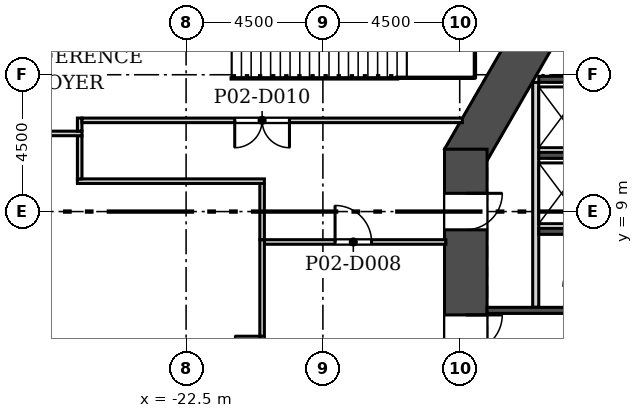
"""IFC4 building model, lengths in metres.
Left out: names, types, materials, properties, quantities, classifications, styles, units other than length and angle.
Written with IfcOpenShell. Run it as: python <this file> out.ifc"""

import sys

from ifc_helpers import new_model, si_unit, direction, frame, frame_2d, origin, place, context, subcontext, project, spatial, rectangle, extrude, element, fill, save


model = new_model("IFC4")
c1 = context("Model", 3, precision=1e-05, world=origin(), true_north=direction((0.0, 1.0)))
c2 = subcontext(c1, "Body", "Model", "MODEL_VIEW")
j1 = project(units=[si_unit("LENGTHUNIT", "METRE"), si_unit("PLANEANGLEUNIT", "RADIAN")], contexts=[c1])
p1 = place(None, origin())
s1 = spatial("IfcSite", under=j1, at=p1, CompositionType="ELEMENT")
p2 = place(p1, origin())
s2 = spatial("IfcBuilding", under=s1, at=p2, CompositionType="ELEMENT")
p3 = place(p2, frame((0.0, 0.0, 14.0)))
s3 = spatial("IfcBuildingStorey", under=s2, at=p3, CompositionType="ELEMENT", Elevation=14.0)
p4 = place(p3, frame((-8.805, 18.65, 0.0), z_axis=(0.0, 0.0, 1.0), x_axis=(-0.50000187635, -0.866024320471, 0.0)))
e1 = element("IfcWall", 1, at=p4, inside=s3, PredefinedType="SHEAR", context=c2, shape_type="SweptSolid", body=[
    extrude(rectangle(XDim=9.177, YDim=1.4, at=frame_2d((4.588, 0.0))), origin(), (0.0, 0.0, 1.0), 6.0),
])
p5 = place(p3, frame((-13.3, 11.052, 0.0), z_axis=(0.0, 0.0, 1.0), x_axis=(0.0, -1.0, 0.0)))
e2 = element("IfcWall", 2, at=p5, inside=s3, PredefinedType="SHEAR", context=c2, shape_type="SweptSolid", body=[
    extrude(rectangle(XDim=10.202, YDim=1.4, at=frame_2d((5.101, 0.0))), origin(), (0.0, 0.0, 1.0), 6.0),
])
p6 = place(p5, frame((5.453, 0.0, 0.0)))
e3 = element("IfcOpeningElement", 3, at=p6, cuts=e2, PredefinedType="OPENING", context=c2, shape_type="SweptSolid", body=[
    extrude(rectangle(XDim=1.2, YDim=2.1, at=frame_2d((0.6, 1.05))), frame((0.0, 0.71, 0.0), z_axis=(0.0, -1.0, 0.0), x_axis=(1.0, 0.0, 0.0)), (0.0, 0.0, 1.0), 1.42),
])
p7 = place(p5, frame((1.453, 0.0, 0.0)))
e4 = element("IfcOpeningElement", 4, at=p7, cuts=e2, PredefinedType="OPENING", context=c2, shape_type="SweptSolid", body=[
    extrude(rectangle(XDim=1.2, YDim=2.1, at=frame_2d((0.6, 1.05))), frame((0.0, 0.71, 0.0), z_axis=(0.0, -1.0, 0.0), x_axis=(1.0, 0.0, 0.0)), (0.0, 0.0, 1.0), 1.42),
])
p8 = place(p3, frame((-4.853, 74.393, 0.0), z_axis=(0.0, 0.0, 1.0), x_axis=(-0.49999894854, -0.866026010844, 0.0)))
e5 = element("IfcWall", 5, at=p8, inside=s3, PredefinedType="SOLIDWALL", context=c2, shape_type="SweptSolid", body=[
    extrude(rectangle(XDim=76.0, YDim=0.34, at=frame_2d((38.0, 0.0))), origin(), (0.0, 0.0, 1.0), 5.7),
])
p9 = place(p8, frame((1.058, 0.0, 0.9)))
e6 = element("IfcOpeningElement", 6, at=p9, cuts=e5, PredefinedType="OPENING", context=c2, shape_type="SweptSolid", body=[
    extrude(rectangle(XDim=1.885, YDim=3.5, at=frame_2d((0.942, 1.75))), frame((0.0, 0.18, 0.0), z_axis=(0.0, -1.0, 0.0), x_axis=(1.0, 0.0, 0.0)), (0.0, 0.0, 1.0), 0.36),
])
p10 = place(p8, frame((4.058, 0.0, 0.9)))
e7 = element("IfcOpeningElement", 7, at=p10, cuts=e5, PredefinedType="OPENING", context=c2, shape_type="SweptSolid", body=[
    extrude(rectangle(XDim=1.885, YDim=3.5, at=frame_2d((0.942, 1.75))), frame((0.0, 0.18, 0.0), z_axis=(0.0, -1.0, 0.0), x_axis=(1.0, 0.0, 0.0)), (0.0, 0.0, 1.0), 0.36),
])
p11 = place(p8, frame((7.058, 0.0, 0.9)))
e8 = element("IfcOpeningElement", 8, at=p11, cuts=e5, PredefinedType="OPENING", context=c2, shape_type="SweptSolid", body=[
    extrude(rectangle(XDim=1.885, YDim=3.5, at=frame_2d((0.942, 1.75))), frame((0.0, 0.18, 0.0), z_axis=(0.0, -1.0, 0.0), x_axis=(1.0, 0.0, 0.0)), (0.0, 0.0, 1.0), 0.36),
])
p12 = place(p8, frame((10.058, 0.0, 0.9)))
e9 = element("IfcOpeningElement", 9, at=p12, cuts=e5, PredefinedType="OPENING", context=c2, shape_type="SweptSolid", body=[
    extrude(rectangle(XDim=1.885, YDim=3.5, at=frame_2d((0.942, 1.75))), frame((0.0, 0.18, 0.0), z_axis=(0.0, -1.0, 0.0), x_axis=(1.0, 0.0, 0.0)), (0.0, 0.0, 1.0), 0.36),
])
p13 = place(p8, frame((13.058, 0.0, 0.9)))
e10 = element("IfcOpeningElement", 10, at=p13, cuts=e5, PredefinedType="OPENING", context=c2, shape_type="SweptSolid", body=[
    extrude(rectangle(XDim=1.885, YDim=3.5, at=frame_2d((0.942, 1.75))), frame((0.0, 0.18, 0.0), z_axis=(0.0, -1.0, 0.0), x_axis=(1.0, 0.0, 0.0)), (0.0, 0.0, 1.0), 0.36),
])
p14 = place(p8, frame((16.058, 0.0, 0.9)))
e11 = element("IfcOpeningElement", 11, at=p14, cuts=e5, PredefinedType="OPENING", context=c2, shape_type="SweptSolid", body=[
    extrude(rectangle(XDim=1.885, YDim=3.5, at=frame_2d((0.942, 1.75))), frame((0.0, 0.18, 0.0), z_axis=(0.0, -1.0, 0.0), x_axis=(1.0, 0.0, 0.0)), (0.0, 0.0, 1.0), 0.36),
])
p15 = place(p8, frame((19.058, 0.0, 0.9)))
e12 = element("IfcOpeningElement", 12, at=p15, cuts=e5, PredefinedType="OPENING", context=c2, shape_type="SweptSolid", body=[
    extrude(rectangle(XDim=1.885, YDim=3.5, at=frame_2d((0.942, 1.75))), frame((0.0, 0.18, 0.0), z_axis=(0.0, -1.0, 0.0), x_axis=(1.0, 0.0, 0.0)), (0.0, 0.0, 1.0), 0.36),
])
p16 = place(p8, frame((22.058, 0.0, 0.9)))
e13 = element("IfcOpeningElement", 13, at=p16, cuts=e5, PredefinedType="OPENING", context=c2, shape_type="SweptSolid", body=[
    extrude(rectangle(XDim=1.885, YDim=3.5, at=frame_2d((0.942, 1.75))), frame((0.0, 0.18, 0.0), z_axis=(0.0, -1.0, 0.0), x_axis=(1.0, 0.0, 0.0)), (0.0, 0.0, 1.0), 0.36),
])
p17 = place(p8, frame((25.058, 0.0, 0.9)))
e14 = element("IfcOpeningElement", 14, at=p17, cuts=e5, PredefinedType="OPENING", context=c2, shape_type="SweptSolid", body=[
    extrude(rectangle(XDim=1.885, YDim=3.5, at=frame_2d((0.942, 1.75))), frame((0.0, 0.18, 0.0), z_axis=(0.0, -1.0, 0.0), x_axis=(1.0, 0.0, 0.0)), (0.0, 0.0, 1.0), 0.36),
])
p18 = place(p8, frame((28.058, 0.0, 0.9)))
e15 = element("IfcOpeningElement", 15, at=p18, cuts=e5, PredefinedType="OPENING", context=c2, shape_type="SweptSolid", body=[
    extrude(rectangle(XDim=1.885, YDim=3.5, at=frame_2d((0.942, 1.75))), frame((0.0, 0.18, 0.0), z_axis=(0.0, -1.0, 0.0), x_axis=(1.0, 0.0, 0.0)), (0.0, 0.0, 1.0), 0.36),
])
p19 = place(p8, frame((31.058, 0.0, 0.9)))
e16 = element("IfcOpeningElement", 16, at=p19, cuts=e5, PredefinedType="OPENING", context=c2, shape_type="SweptSolid", body=[
    extrude(rectangle(XDim=1.885, YDim=3.5, at=frame_2d((0.942, 1.75))), frame((0.0, 0.18, 0.0), z_axis=(0.0, -1.0, 0.0), x_axis=(1.0, 0.0, 0.0)), (0.0, 0.0, 1.0), 0.36),
])
p20 = place(p8, frame((34.058, 0.0, 0.9)))
e17 = element("IfcOpeningElement", 17, at=p20, cuts=e5, PredefinedType="OPENING", context=c2, shape_type="SweptSolid", body=[
    extrude(rectangle(XDim=1.885, YDim=3.5, at=frame_2d((0.942, 1.75))), frame((0.0, 0.18, 0.0), z_axis=(0.0, -1.0, 0.0), x_axis=(1.0, 0.0, 0.0)), (0.0, 0.0, 1.0), 0.36),
])
p21 = place(p8, frame((37.058, 0.0, 0.9)))
e18 = element("IfcOpeningElement", 18, at=p21, cuts=e5, PredefinedType="OPENING", context=c2, shape_type="SweptSolid", body=[
    extrude(rectangle(XDim=1.885, YDim=3.5, at=frame_2d((0.942, 1.75))), frame((0.0, 0.18, 0.0), z_axis=(0.0, -1.0, 0.0), x_axis=(1.0, 0.0, 0.0)), (0.0, 0.0, 1.0), 0.36),
])
p22 = place(p8, frame((40.058, 0.0, 0.9)))
e19 = element("IfcOpeningElement", 19, at=p22, cuts=e5, PredefinedType="OPENING", context=c2, shape_type="SweptSolid", body=[
    extrude(rectangle(XDim=1.885, YDim=3.5, at=frame_2d((0.942, 1.75))), frame((0.0, 0.18, 0.0), z_axis=(0.0, -1.0, 0.0), x_axis=(1.0, 0.0, 0.0)), (0.0, 0.0, 1.0), 0.36),
])
p23 = place(p8, frame((43.058, 0.0, 0.9)))
e20 = element("IfcOpeningElement", 20, at=p23, cuts=e5, PredefinedType="OPENING", context=c2, shape_type="SweptSolid", body=[
    extrude(rectangle(XDim=1.885, YDim=3.5, at=frame_2d((0.942, 1.75))), frame((0.0, 0.18, 0.0), z_axis=(0.0, -1.0, 0.0), x_axis=(1.0, 0.0, 0.0)), (0.0, 0.0, 1.0), 0.36),
])
p24 = place(p8, frame((46.058, 0.0, 0.9)))
e21 = element("IfcOpeningElement", 21, at=p24, cuts=e5, PredefinedType="OPENING", context=c2, shape_type="SweptSolid", body=[
    extrude(rectangle(XDim=1.885, YDim=3.5, at=frame_2d((0.942, 1.75))), frame((0.0, 0.18, 0.0), z_axis=(0.0, -1.0, 0.0), x_axis=(1.0, 0.0, 0.0)), (0.0, 0.0, 1.0), 0.36),
])
p25 = place(p8, frame((49.058, 0.0, 0.9)))
e22 = element("IfcOpeningElement", 22, at=p25, cuts=e5, PredefinedType="OPENING", context=c2, shape_type="SweptSolid", body=[
    extrude(rectangle(XDim=1.885, YDim=3.5, at=frame_2d((0.942, 1.75))), frame((0.0, 0.18, 0.0), z_axis=(0.0, -1.0, 0.0), x_axis=(1.0, 0.0, 0.0)), (0.0, 0.0, 1.0), 0.36),
])
p26 = place(p8, frame((52.058, 0.0, 0.9)))
e23 = element("IfcOpeningElement", 23, at=p26, cuts=e5, PredefinedType="OPENING", context=c2, shape_type="SweptSolid", body=[
    extrude(rectangle(XDim=1.885, YDim=3.5, at=frame_2d((0.942, 1.75))), frame((0.0, 0.18, 0.0), z_axis=(0.0, -1.0, 0.0), x_axis=(1.0, 0.0, 0.0)), (0.0, 0.0, 1.0), 0.36),
])
p27 = place(p8, frame((55.058, 0.0, 0.9)))
e24 = element("IfcOpeningElement", 24, at=p27, cuts=e5, PredefinedType="OPENING", context=c2, shape_type="SweptSolid", body=[
    extrude(rectangle(XDim=1.885, YDim=3.5, at=frame_2d((0.942, 1.75))), frame((0.0, 0.18, 0.0), z_axis=(0.0, -1.0, 0.0), x_axis=(1.0, 0.0, 0.0)), (0.0, 0.0, 1.0), 0.36),
])
p28 = place(p8, frame((58.058, 0.0, 0.9)))
e25 = element("IfcOpeningElement", 25, at=p28, cuts=e5, PredefinedType="OPENING", context=c2, shape_type="SweptSolid", body=[
    extrude(rectangle(XDim=1.885, YDim=3.5, at=frame_2d((0.942, 1.75))), frame((0.0, 0.18, 0.0), z_axis=(0.0, -1.0, 0.0), x_axis=(1.0, 0.0, 0.0)), (0.0, 0.0, 1.0), 0.36),
])
p29 = place(p8, frame((61.058, 0.0, 0.9)))
e26 = element("IfcOpeningElement", 26, at=p29, cuts=e5, PredefinedType="OPENING", context=c2, shape_type="SweptSolid", body=[
    extrude(rectangle(XDim=1.885, YDim=3.5, at=frame_2d((0.942, 1.75))), frame((0.0, 0.18, 0.0), z_axis=(0.0, -1.0, 0.0), x_axis=(1.0, 0.0, 0.0)), (0.0, 0.0, 1.0), 0.36),
])
p30 = place(p8, frame((64.058, 0.0, 0.9)))
e27 = element("IfcOpeningElement", 27, at=p30, cuts=e5, PredefinedType="OPENING", context=c2, shape_type="SweptSolid", body=[
    extrude(rectangle(XDim=1.885, YDim=3.5, at=frame_2d((0.942, 1.75))), frame((0.0, 0.18, 0.0), z_axis=(0.0, -1.0, 0.0), x_axis=(1.0, 0.0, 0.0)), (0.0, 0.0, 1.0), 0.36),
])
p31 = place(p8, frame((67.058, 0.0, 0.9)))
e28 = element("IfcOpeningElement", 28, at=p31, cuts=e5, PredefinedType="OPENING", context=c2, shape_type="SweptSolid", body=[
    extrude(rectangle(XDim=1.885, YDim=3.5, at=frame_2d((0.942, 1.75))), frame((0.0, 0.18, 0.0), z_axis=(0.0, -1.0, 0.0), x_axis=(1.0, 0.0, 0.0)), (0.0, 0.0, 1.0), 0.36),
])
p32 = place(p8, frame((70.058, 0.0, 0.9)))
e29 = element("IfcOpeningElement", 29, at=p32, cuts=e5, PredefinedType="OPENING", context=c2, shape_type="SweptSolid", body=[
    extrude(rectangle(XDim=1.885, YDim=3.5, at=frame_2d((0.942, 1.75))), frame((0.0, 0.18, 0.0), z_axis=(0.0, -1.0, 0.0), x_axis=(1.0, 0.0, 0.0)), (0.0, 0.0, 1.0), 0.36),
])
p33 = place(p8, frame((73.058, 0.0, 0.9)))
e30 = element("IfcOpeningElement", 30, at=p33, cuts=e5, PredefinedType="OPENING", context=c2, shape_type="SweptSolid", body=[
    extrude(rectangle(XDim=1.885, YDim=3.5, at=frame_2d((0.942, 1.75))), frame((0.0, 0.18, 0.0), z_axis=(0.0, -1.0, 0.0), x_axis=(1.0, 0.0, 0.0)), (0.0, 0.0, 1.0), 0.36),
])
p34 = place(p3, frame((-11.0, 5.85, 0.0), z_axis=(0.0, 0.0, 1.0), x_axis=(0.0, 1.0, 0.0)))
e31 = element("IfcWall", 31, at=p34, inside=s3, PredefinedType="SOLIDWALL", context=c2, shape_type="SweptSolid", body=[
    extrude(rectangle(XDim=7.4, YDim=0.2, at=frame_2d((3.7, 0.0))), origin(), (0.0, 0.0, 1.0), 5.7),
])
p35 = place(p3, frame((-10.9, 8.35, -0.3), z_axis=(0.0, 0.0, 1.0), x_axis=(1.0, 0.0, 0.0)))
e32 = element("IfcWall", 32, at=p35, inside=s3, PredefinedType="SOLIDWALL", context=c2, shape_type="SweptSolid", body=[
    extrude(rectangle(XDim=2.0, YDim=0.2, at=frame_2d((1.0, 0.0))), origin(), (0.0, 0.0, 1.0), 6.0),
])
p36 = place(p3, frame((-12.6, 5.75, -0.3), z_axis=(0.0, 0.0, 1.0), x_axis=(1.0, 0.0, 0.0)))
e33 = element("IfcWall", 33, at=p36, inside=s3, PredefinedType="SOLIDWALL", context=c2, shape_type="SweptSolid", body=[
    extrude(rectangle(XDim=11.4, YDim=0.2, at=frame_2d((5.7, 0.0))), origin(), (0.0, 0.0, 1.0), 6.0),
])
for number, where, z_axis, x_axis in (
    (34, (-10.9, 10.85, -0.3), (0.0, 0.0, 1.0), (1.0, 0.0, 0.0)),
    (35, (-10.9, 13.35, -0.3), (0.0, 0.0, 1.0), (1.0, 0.0, 0.0)),
):
    element("IfcWall", number, at=place(p3, frame(where, z_axis=z_axis, x_axis=x_axis)), inside=s3, PredefinedType="SOLIDWALL", context=c2, shape_type="SweptSolid", body=[
        extrude(rectangle(XDim=2.0, YDim=0.2, at=frame_2d((1.0, 0.0))), origin(), (0.0, 0.0, 1.0), 6.0),
    ])
p37 = place(p3, frame((-19.925, 8.0, 0.0), z_axis=(0.0, 0.0, 1.0), x_axis=(1.0, 0.0, 0.0)))
e36 = element("IfcWall", 36, at=p37, inside=s3, PredefinedType="PARTITIONING", context=c2, shape_type="SweptSolid", body=[
    extrude(rectangle(XDim=5.97, YDim=0.15, at=frame_2d((2.985, 0.0))), origin(), (0.0, 0.0, 1.0), 5.7),
])
p38 = place(p37, frame((2.325, 0.0, 0.0)))
e37 = element("IfcOpeningElement", 37, at=p38, cuts=e36, PredefinedType="OPENING", context=c2, shape_type="SweptSolid", body=[
    extrude(rectangle(XDim=1.2, YDim=2.1, at=frame_2d((0.6, 1.05))), frame((0.0, 0.085, 0.0), z_axis=(0.0, -1.0, 0.0), x_axis=(1.0, 0.0, 0.0)), (0.0, 0.0, 1.0), 0.17),
])
p39 = place(p3, frame((-20.0, 8.075, 0.0), z_axis=(0.0, 0.0, 1.0), x_axis=(0.0, -1.0, 0.0)))
e38 = element("IfcWall", 38, at=p39, inside=s3, PredefinedType="PARTITIONING", context=c2, shape_type="SweptSolid", body=[
    extrude(rectangle(XDim=7.78, YDim=0.15, at=frame_2d((3.89, 0.0))), origin(), (0.0, 0.0, 1.0), 5.7),
])
p40 = place(p39, frame((3.175, 0.0, 0.0)))
e39 = element("IfcOpeningElement", 39, at=p40, cuts=e38, PredefinedType="OPENING", context=c2, shape_type="SweptSolid", body=[
    extrude(rectangle(XDim=1.8, YDim=2.1, at=frame_2d((0.9, 1.05))), frame((0.0, 0.085, 0.0), z_axis=(0.0, -1.0, 0.0), x_axis=(1.0, 0.0, 0.0)), (0.0, 0.0, 1.0), 0.17),
])
p41 = place(p3, frame((-20.0, 9.925, 0.0), z_axis=(0.0, 0.0, 1.0), x_axis=(0.0, -1.0, 0.0)))
e40 = element("IfcWall", 40, at=p41, inside=s3, PredefinedType="PARTITIONING", context=c2, shape_type="SweptSolid", body=[
    extrude(rectangle(XDim=1.85, YDim=0.15, at=frame_2d((0.925, 0.0))), origin(), (0.0, 0.0, 1.0), 5.7),
])
p42 = place(p3, frame((-26.075, 10.0, 0.0), z_axis=(0.0, 0.0, 1.0), x_axis=(1.0, 0.0, 0.0)))
e41 = element("IfcWall", 41, at=p42, inside=s3, PredefinedType="PARTITIONING", context=c2, shape_type="SweptSolid", body=[
    extrude(rectangle(XDim=6.15, YDim=0.15, at=frame_2d((3.075, 0.0))), origin(), (0.0, 0.0, 1.0), 5.7),
])
p43 = place(p3, frame((-26.0, 11.495, 0.0), z_axis=(0.0, 0.0, 1.0), x_axis=(0.0, -1.0, 0.0)))
e42 = element("IfcWall", 42, at=p43, inside=s3, PredefinedType="PARTITIONING", context=c2, shape_type="SweptSolid", body=[
    extrude(rectangle(XDim=1.42, YDim=0.15, at=frame_2d((0.71, 0.0))), origin(), (0.0, 0.0, 1.0), 5.7),
])
p44 = place(p3, frame((-40.968, 11.57, 0.0), z_axis=(0.0, 0.0, 1.0), x_axis=(1.0, 0.0, 0.0)))
e43 = element("IfcWall", 43, at=p44, inside=s3, PredefinedType="PARTITIONING", context=c2, shape_type="SweptSolid", body=[
    extrude(rectangle(XDim=15.043, YDim=0.15, at=frame_2d((7.521, 0.0))), origin(), (0.0, 0.0, 1.0), 5.7),
])
p45 = place(p44, frame((2.068, 0.0, 0.0)))
e44 = element("IfcOpeningElement", 44, at=p45, cuts=e43, PredefinedType="OPENING", context=c2, shape_type="SweptSolid", body=[
    extrude(rectangle(XDim=1.8, YDim=2.1, at=frame_2d((0.9, 1.05))), frame((0.0, 0.085, 0.0), z_axis=(0.0, -1.0, 0.0), x_axis=(1.0, 0.0, 0.0)), (0.0, 0.0, 1.0), 0.17),
])
p46 = place(p3, frame((-26.0, 11.645, 0.0), z_axis=(0.0, 0.0, 1.0), x_axis=(0.0, 1.0, 0.0)))
e45 = element("IfcWall", 45, at=p46, inside=s3, PredefinedType="PARTITIONING", context=c2, shape_type="SweptSolid", body=[
    extrude(rectangle(XDim=0.43, YDim=0.15, at=frame_2d((0.215, 0.0))), origin(), (0.0, 0.0, 1.0), 5.7),
])
p47 = place(p3, frame((-25.925, 12.0, 0.0), z_axis=(0.0, 0.0, 1.0), x_axis=(1.0, 0.0, 0.0)))
e46 = element("IfcWall", 46, at=p47, inside=s3, PredefinedType="PARTITIONING", context=c2, shape_type="SweptSolid", body=[
    extrude(rectangle(XDim=12.512, YDim=0.15, at=frame_2d((6.256, 0.0))), origin(), (0.0, 0.0, 1.0), 5.7),
])
p48 = place(p47, frame((5.025, 0.0, 0.0)))
e47 = element("IfcOpeningElement", 47, at=p48, cuts=e46, PredefinedType="OPENING", context=c2, shape_type="SweptSolid", body=[
    extrude(rectangle(XDim=1.8, YDim=2.1, at=frame_2d((0.9, 1.05))), frame((0.0, 0.085, 0.0), z_axis=(0.0, -1.0, 0.0), x_axis=(1.0, 0.0, 0.0)), (0.0, 0.0, 1.0), 0.17),
])
p49 = place(p3, frame((-26.761, 19.108, 0.0), z_axis=(0.0, 0.0, 1.0), x_axis=(-0.499979843709, -0.866037040711, 0.0)))
e48 = element("IfcWall", 48, at=p49, inside=s3, PredefinedType="SOLIDWALL", context=c2, shape_type="SweptSolid", body=[
    extrude(rectangle(XDim=8.293, YDim=0.25, at=frame_2d((4.146, 0.0))), origin(), (0.0, 0.0, 1.0), 5.7),
])
p50 = place(p3, frame((-13.125, 13.45, 0.0), z_axis=(0.0, 0.0, 1.0), x_axis=(0.0, 1.0, 0.0)))
e49 = element("IfcWall", 49, at=p50, inside=s3, PredefinedType="SOLIDWALL", context=c2, shape_type="SweptSolid", body=[
    extrude(rectangle(XDim=5.1, YDim=0.25, at=frame_2d((2.55, 0.0))), origin(), (0.0, 0.0, 1.0), 2.8),
])
p51 = place(p3, frame((-13.125, 13.525, 0.0), z_axis=(0.0, 0.0, 1.0), x_axis=(-1.0, 0.0, 0.0)))
e50 = element("IfcWall", 50, at=p51, inside=s3, PredefinedType="SOLIDWALL", context=c2, shape_type="SweptSolid", body=[
    extrude(rectangle(XDim=2.31, YDim=0.25, at=frame_2d((1.155, 0.0))), origin(), (0.0, 0.0, 1.0), 2.8),
])
p52 = place(p6, origin())
e51 = element("IfcDoor", 51, at=p52, inside=s3, OperationType="SINGLE_SWING_LEFT", PredefinedType="DOOR", context=c2, shape_type="SweptSolid", body=[
    extrude(rectangle(XDim=1.2, YDim=2.1, at=frame_2d((0.6, 1.05))), frame((0.0, 0.025, 0.0), z_axis=(0.0, -1.0, 0.0), x_axis=(1.0, 0.0, 0.0)), (0.0, 0.0, 1.0), 0.05),
])
fill(e3, e51)
p53 = place(p7, origin())
e52 = element("IfcDoor", 52, at=p53, inside=s3, OperationType="SINGLE_SWING_LEFT", PredefinedType="DOOR", context=c2, shape_type="SweptSolid", body=[
    extrude(rectangle(XDim=1.2, YDim=2.1, at=frame_2d((0.6, 1.05))), frame((0.0, 0.025, 0.0), z_axis=(0.0, -1.0, 0.0), x_axis=(1.0, 0.0, 0.0)), (0.0, 0.0, 1.0), 0.05),
])
fill(e4, e52)
p54 = place(p38, origin())
e53 = element("IfcDoor", 53, at=p54, inside=s3, OperationType="SINGLE_SWING_LEFT", PredefinedType="DOOR", context=c2, shape_type="SweptSolid", body=[
    extrude(rectangle(XDim=1.2, YDim=2.1, at=frame_2d((0.6, 1.05))), frame((0.0, 0.025, 0.0), z_axis=(0.0, -1.0, 0.0), x_axis=(1.0, 0.0, 0.0)), (0.0, 0.0, 1.0), 0.05),
])
fill(e37, e53)
p55 = place(p48, frame((1.8, 0.0, 0.0), z_axis=(0.0, 0.0, 1.0), x_axis=(-1.0, 0.0, 0.0)))
e54 = element("IfcDoor", 54, at=p55, inside=s3, OperationType="DOUBLE_DOOR_SINGLE_SWING", PredefinedType="DOOR", context=c2, shape_type="SweptSolid", body=[
    extrude(rectangle(XDim=1.8, YDim=2.1, at=frame_2d((0.9, 1.05))), frame((0.0, 0.025, 0.0), z_axis=(0.0, -1.0, 0.0), x_axis=(1.0, 0.0, 0.0)), (0.0, 0.0, 1.0), 0.05),
])
fill(e47, e54)
p56 = place(p40, frame((1.8, 0.0, 0.0), z_axis=(0.0, 0.0, 1.0), x_axis=(-1.0, 0.0, 0.0)))
e55 = element("IfcDoor", 55, at=p56, inside=s3, OperationType="DOUBLE_DOOR_SINGLE_SWING", PredefinedType="DOOR", context=c2, shape_type="SweptSolid", body=[
    extrude(rectangle(XDim=1.8, YDim=2.1, at=frame_2d((0.9, 1.05))), frame((0.0, 0.025, 0.0), z_axis=(0.0, -1.0, 0.0), x_axis=(1.0, 0.0, 0.0)), (0.0, 0.0, 1.0), 0.05),
])
fill(e39, e55)
save(model, sys.argv[1])
